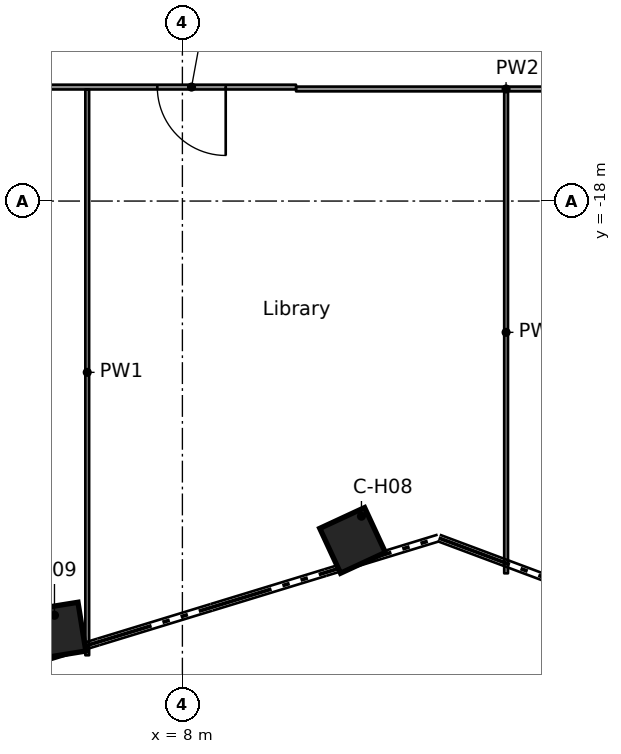
"""IFC4 building model, lengths in metres.
Left out: names, types, materials, properties, quantities, classifications, styles, units other than length and angle.
Written with IfcOpenShell. Run it as: python <this file> out.ifc"""

import sys

from ifc_helpers import new_model, si_unit, direction, frame, frame_2d, origin, origin_2d, place, context, subcontext, project, spatial, rectangle, extrude, element, fill, save


model = new_model("IFC4")
c1 = context("Model", 3, precision=1e-05, world=origin(), true_north=direction((0.0, 1.0)))
c2 = subcontext(c1, "Body", "Model", "MODEL_VIEW")
j1 = project(units=[si_unit("LENGTHUNIT", "METRE"), si_unit("PLANEANGLEUNIT", "RADIAN")], contexts=[c1])
p1 = place(None, origin())
s1 = spatial("IfcSite", under=j1, at=p1, CompositionType="ELEMENT")
p2 = place(p1, origin())
s2 = spatial("IfcBuilding", under=s1, at=p2, CompositionType="ELEMENT")
p3 = place(p2, frame((0.0, 0.0, 91.2)))
s3 = spatial("IfcBuildingStorey", under=s2, at=p3, CompositionType="ELEMENT", Elevation=91.2)
for number, where, z_axis, x_axis in (
    (1, (12.478, -26.929, 0.0), (0.0, 0.0, 1.0), (0.42, -0.907, 0.0)),
    (2, (4.714, -29.302, 0.0), (0.0, 0.0, 1.0), (0.159, -0.987, 0.0)),
):
    element("IfcColumn", number, at=place(p3, frame(where, z_axis=z_axis, x_axis=x_axis)), inside=s3, PredefinedType="COLUMN", context=c2, shape_type="SweptSolid", body=[
        extrude(rectangle(XDim=1.3, YDim=1.3, at=origin_2d()), origin(), (0.0, 0.0, 1.0), 3.5),
    ])
p4 = place(p3, frame((22.043, -15.051, 0.0), z_axis=(0.0, 0.0, 1.0), x_axis=(-1.0, 0.0, 0.0)))
e3 = element("IfcWall", 3, at=p4, inside=s3, PredefinedType="PARTITIONING", context=c2, shape_type="SweptSolid", body=[
    extrude(rectangle(XDim=11.052, YDim=0.125, at=frame_2d((5.526, 0.0))), origin(), (0.0, 0.0, 1.0), 3.08),
])
p5 = place(p4, frame((2.35, 0.0, 0.0)))
e4 = element("IfcOpeningElement", 4, at=p5, cuts=e3, PredefinedType="OPENING", context=c2, shape_type="SweptSolid", body=[
    extrude(rectangle(XDim=0.9, YDim=2.1, at=frame_2d((0.45, 1.05))), frame((0.0, 0.073, 0.0), z_axis=(0.0, -1.0, 0.0), x_axis=(1.0, 0.0, 0.0)), (0.0, 0.0, 1.0), 0.145),
])
p6 = place(p3, frame((10.99, -15.001, 0.0), z_axis=(0.0, 0.0, 1.0), x_axis=(-1.0, 0.0, 0.0)))
e5 = element("IfcWall", 5, at=p6, inside=s3, PredefinedType="PARTITIONING", context=c2, shape_type="SweptSolid", body=[
    extrude(rectangle(XDim=21.98, YDim=0.125, at=frame_2d((10.99, 0.0))), origin(), (0.0, 0.0, 1.0), 3.08),
])
p7 = place(p6, frame((13.09, 0.0, 0.0)))
e6 = element("IfcOpeningElement", 6, at=p7, cuts=e5, PredefinedType="OPENING", context=c2, shape_type="SweptSolid", body=[
    extrude(rectangle(XDim=1.1, YDim=2.1, at=frame_2d((0.55, 1.05))), frame((0.0, 0.073, 0.0), z_axis=(0.0, -1.0, 0.0), x_axis=(1.0, 0.0, 0.0)), (0.0, 0.0, 1.0), 0.145),
])
p8 = place(p6, frame((7.844, 0.0, 0.0)))
e7 = element("IfcOpeningElement", 7, at=p8, cuts=e5, PredefinedType="OPENING", context=c2, shape_type="SweptSolid", body=[
    extrude(rectangle(XDim=0.9, YDim=2.1, at=frame_2d((0.45, 1.05))), frame((0.0, 0.073, 0.0), z_axis=(0.0, -1.0, 0.0), x_axis=(1.0, 0.0, 0.0)), (0.0, 0.0, 1.0), 0.145),
])
p9 = place(p6, frame((1.85, 0.0, 0.0)))
e8 = element("IfcOpeningElement", 8, at=p9, cuts=e5, PredefinedType="OPENING", context=c2, shape_type="SweptSolid", body=[
    extrude(rectangle(XDim=1.8, YDim=2.1, at=frame_2d((0.9, 1.05))), frame((0.0, 0.073, 0.0), z_axis=(0.0, -1.0, 0.0), x_axis=(1.0, 0.0, 0.0)), (0.0, 0.0, 1.0), 0.145),
])
p10 = place(p3, frame((16.518, -27.795, 0.0), z_axis=(0.0, 0.0, 1.0), x_axis=(0.0, 1.0, 0.0)))
e9 = element("IfcWall", 9, at=p10, inside=s3, PredefinedType="PARTITIONING", context=c2, shape_type="SweptSolid", body=[
    extrude(rectangle(XDim=12.681, YDim=0.1, at=frame_2d((6.34, 0.0))), origin(), (0.0, 0.0, 1.0), 3.08),
])
p11 = place(p3, frame((5.496, -29.951, 0.0), z_axis=(0.0, 0.0, 1.0), x_axis=(0.0, 1.0, 0.0)))
e10 = element("IfcWall", 10, at=p11, inside=s3, PredefinedType="PARTITIONING", context=c2, shape_type="SweptSolid", body=[
    extrude(rectangle(XDim=14.888, YDim=0.1, at=frame_2d((7.444, 0.0))), origin(), (0.0, 0.0, 1.0), 3.08),
])
p12 = place(p9, origin())
e11 = element("IfcDoor", 11, at=p12, inside=s3, OperationType="DOUBLE_DOOR_SINGLE_SWING", PredefinedType="DOOR", context=c2, shape_type="SweptSolid", body=[
    extrude(rectangle(XDim=1.8, YDim=2.1, at=frame_2d((0.9, 1.05))), frame((0.0, 0.025, 0.0), z_axis=(0.0, -1.0, 0.0), x_axis=(1.0, 0.0, 0.0)), (0.0, 0.0, 1.0), 0.05),
])
fill(e8, e11)
save(model, sys.argv[1])
